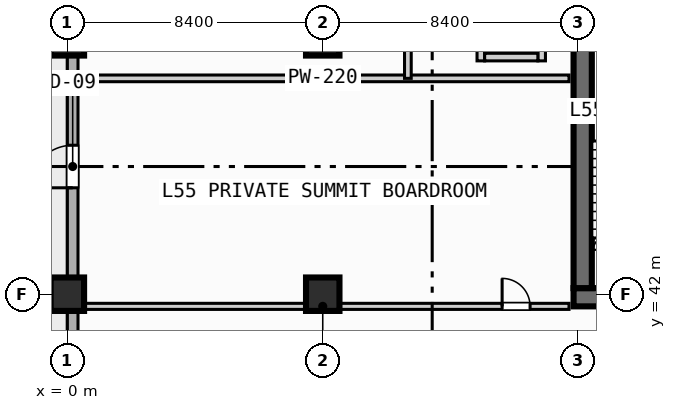
"""IFC4 building model, lengths in metres.
Left out: names, types, materials, properties, quantities, classifications, styles, units other than length and angle.
Written with IfcOpenShell. Run it as: python <this file> out.ifc"""

import sys

from ifc_helpers import new_model, si_unit, direction, frame, frame_2d, origin, origin_2d, place, context, subcontext, project, spatial, rectangle, extrude, element, fill, save


model = new_model("IFC4")
c1 = context("Model", 3, precision=1e-05, world=origin(), true_north=direction((0.0, 1.0)))
c2 = subcontext(c1, "Body", "Model", "MODEL_VIEW")
j1 = project(units=[si_unit("LENGTHUNIT", "METRE"), si_unit("PLANEANGLEUNIT", "RADIAN")], contexts=[c1])
p1 = place(None, origin())
s1 = spatial("IfcSite", under=j1, at=p1, CompositionType="ELEMENT")
p2 = place(p1, origin())
s2 = spatial("IfcBuilding", under=s1, at=p2, CompositionType="ELEMENT")
p3 = place(p2, frame((0.0, 0.0, 224.0)))
s3 = spatial("IfcBuildingStorey", under=s2, at=p3, CompositionType="ELEMENT", Elevation=224.0)
p4 = place(p3, frame((16.65, 41.9, 0.0), z_axis=(0.0, 0.0, 1.0), x_axis=(1.0, 0.0, 0.0)))
e1 = element("IfcWall", 1, at=p4, inside=s3, PredefinedType="SHEAR", context=c2, shape_type="SweptSolid", body=[
    extrude(rectangle(XDim=1.35, YDim=0.6, at=frame_2d((0.675, 0.0))), origin(), (0.0, 0.0, 1.0), 3.75),
])
p5 = place(p3, frame((16.95, 42.2, 0.0), z_axis=(0.0, 0.0, 1.0), x_axis=(0.0, 1.0, 0.0)))
e2 = element("IfcWall", 2, at=p5, inside=s3, PredefinedType="SHEAR", context=c2, shape_type="SweptSolid", body=[
    extrude(rectangle(XDim=16.35, YDim=0.6, at=frame_2d((8.175, 0.0))), origin(), (0.0, 0.0, 1.0), 3.75),
])
for number, where, z_axis, x_axis in (
    (3, (0.0, 42.0, 0.0), (0.0, 0.0, 1.0), (1.0, 0.0, 0.0)),
    (4, (0.0, 50.4, 0.0), (0.0, 0.0, 1.0), (1.0, 0.0, 0.0)),
    (5, (8.4, 42.0, 0.0), (0.0, 0.0, 1.0), (1.0, 0.0, 0.0)),
    (6, (8.4, 50.4, 0.0), (0.0, 0.0, 1.0), (1.0, 0.0, 0.0)),
):
    element("IfcColumn", number, at=place(p3, frame(where, z_axis=z_axis, x_axis=x_axis)), inside=s3, PredefinedType="COLUMN", context=c2, shape_type="SweptSolid", body=[
        extrude(rectangle(XDim=1.1, YDim=1.1, at=origin_2d()), origin(), (0.0, 0.0, 1.0), 4.2),
    ])
p6 = place(p3, frame((0.175, 3.175, 0.0), z_axis=(0.0, 0.0, 1.0), x_axis=(0.0, 1.0, 0.0)))
e7 = element("IfcWall", 7, at=p6, inside=s3, PredefinedType="STANDARD", context=c2, shape_type="SweptSolid", body=[
    extrude(rectangle(XDim=69.25, YDim=0.35, at=frame_2d((34.625, 0.0))), origin(), (0.0, 0.0, 1.0), 3.75),
])
p7 = place(p6, frame((42.325, 0.0, 0.0)))
e8 = element("IfcOpeningElement", 8, at=p7, cuts=e7, PredefinedType="OPENING", context=c2, shape_type="SweptSolid", body=[
    extrude(rectangle(XDim=1.4, YDim=2.2, at=frame_2d((0.7, 1.1))), frame((0.0, 0.185, 0.0), z_axis=(0.0, -1.0, 0.0), x_axis=(1.0, 0.0, 0.0)), (0.0, 0.0, 1.0), 0.37),
])
p8 = place(p6, frame((8.175, 0.0, 0.85)))
e9 = element("IfcOpeningElement", 9, at=p8, cuts=e7, PredefinedType="OPENING", context=c2, shape_type="SweptSolid", body=[
    extrude(rectangle(XDim=2.5, YDim=2.2, at=frame_2d((1.25, 1.1))), frame((0.0, 0.185, 0.0), z_axis=(0.0, -1.0, 0.0), x_axis=(1.0, 0.0, 0.0)), (0.0, 0.0, 1.0), 0.37),
])
p9 = place(p6, frame((24.975, 0.0, 0.85)))
e10 = element("IfcOpeningElement", 10, at=p9, cuts=e7, PredefinedType="OPENING", context=c2, shape_type="SweptSolid", body=[
    extrude(rectangle(XDim=2.5, YDim=2.2, at=frame_2d((1.25, 1.1))), frame((0.0, 0.185, 0.0), z_axis=(0.0, -1.0, 0.0), x_axis=(1.0, 0.0, 0.0)), (0.0, 0.0, 1.0), 0.37),
])
p10 = place(p6, frame((33.375, 0.0, 0.85)))
e11 = element("IfcOpeningElement", 11, at=p10, cuts=e7, PredefinedType="OPENING", context=c2, shape_type="SweptSolid", body=[
    extrude(rectangle(XDim=2.5, YDim=2.2, at=frame_2d((1.25, 1.1))), frame((0.0, 0.185, 0.0), z_axis=(0.0, -1.0, 0.0), x_axis=(1.0, 0.0, 0.0)), (0.0, 0.0, 1.0), 0.37),
])
p11 = place(p3, frame((13.6, 49.675, 0.0), z_axis=(0.0, 0.0, 1.0), x_axis=(0.0, 1.0, 0.0)))
e12 = element("IfcWall", 12, at=p11, inside=s3, PredefinedType="SOLIDWALL", context=c2, shape_type="SweptSolid", body=[
    extrude(rectangle(XDim=2.75, YDim=0.25, at=frame_2d((1.375, 0.0))), origin(), (0.0, 0.0, 1.0), 3.75),
])
p12 = place(p11, frame((0.4, 0.0, 0.0)))
e13 = element("IfcOpeningElement", 13, at=p12, cuts=e12, PredefinedType="OPENING", context=c2, shape_type="SweptSolid", body=[
    extrude(rectangle(XDim=1.1, YDim=2.15, at=frame_2d((0.55, 1.075))), frame((0.0, 0.135, 0.0), z_axis=(0.0, -1.0, 0.0), x_axis=(1.0, 0.0, 0.0)), (0.0, 0.0, 1.0), 0.27),
])
p13 = place(p3, frame((15.6, 49.675, 0.0), z_axis=(0.0, 0.0, 1.0), x_axis=(0.0, 1.0, 0.0)))
e14 = element("IfcWall", 14, at=p13, inside=s3, PredefinedType="SOLIDWALL", context=c2, shape_type="SweptSolid", body=[
    extrude(rectangle(XDim=2.75, YDim=0.25, at=frame_2d((1.375, 0.0))), origin(), (0.0, 0.0, 1.0), 3.75),
])
p14 = place(p3, frame((13.725, 49.8, 0.0), z_axis=(0.0, 0.0, 1.0), x_axis=(1.0, 0.0, 0.0)))
e15 = element("IfcWall", 15, at=p14, inside=s3, PredefinedType="SOLIDWALL", context=c2, shape_type="SweptSolid", body=[
    extrude(rectangle(XDim=1.75, YDim=0.25, at=frame_2d((0.875, 0.0))), origin(), (0.0, 0.0, 1.0), 3.75),
])
p15 = place(p3, frame((0.3, 41.6, 0.0), z_axis=(0.0, 0.0, 1.0), x_axis=(1.0, 0.0, 0.0)))
e16 = element("IfcWall", 16, at=p15, inside=s3, PredefinedType="PARTITIONING", context=c2, shape_type="SweptSolid", body=[
    extrude(rectangle(XDim=16.2, YDim=0.2, at=frame_2d((8.1, 0.0))), origin(), (0.0, 0.0, 1.0), 3.75),
])
p16 = place(p15, frame((14.0, 0.0, 0.0)))
e17 = element("IfcOpeningElement", 17, at=p16, cuts=e16, PredefinedType="OPENING", context=c2, shape_type="SweptSolid", body=[
    extrude(rectangle(XDim=0.92, YDim=2.1, at=frame_2d((0.46, 1.05))), frame((0.0, 0.11, 0.0), z_axis=(0.0, -1.0, 0.0), x_axis=(1.0, 0.0, 0.0)), (0.0, 0.0, 1.0), 0.22),
])
p17 = place(p3, frame((0.3, 49.1, 0.0), z_axis=(0.0, 0.0, 1.0), x_axis=(1.0, 0.0, 0.0)))
e18 = element("IfcWall", 18, at=p17, inside=s3, PredefinedType="PARTITIONING", context=c2, shape_type="SweptSolid", body=[
    extrude(rectangle(XDim=16.2, YDim=0.22, at=frame_2d((8.1, 0.0))), origin(), (0.0, 0.0, 1.0), 3.75),
])
p18 = place(p3, frame((11.2, 49.1, 0.0), z_axis=(0.0, 0.0, 1.0), x_axis=(0.0, 1.0, 0.0)))
e19 = element("IfcWall", 19, at=p18, inside=s3, PredefinedType="PARTITIONING", context=c2, shape_type="SweptSolid", body=[
    extrude(rectangle(XDim=9.3, YDim=0.22, at=frame_2d((4.65, 0.0))), origin(), (0.0, 0.0, 1.0), 3.75),
])
p19 = place(p7, origin())
e20 = element("IfcDoor", 20, at=p19, inside=s3, OperationType="SINGLE_SWING_LEFT", PredefinedType="DOOR", context=c2, shape_type="SweptSolid", body=[
    extrude(rectangle(XDim=1.4, YDim=2.2, at=frame_2d((0.7, 1.1))), frame((0.0, 0.025, 0.0), z_axis=(0.0, -1.0, 0.0), x_axis=(1.0, 0.0, 0.0)), (0.0, 0.0, 1.0), 0.05),
])
fill(e8, e20)
p20 = place(p16, origin())
e21 = element("IfcDoor", 21, at=p20, inside=s3, OperationType="SINGLE_SWING_LEFT", PredefinedType="DOOR", context=c2, shape_type="SweptSolid", body=[
    extrude(rectangle(XDim=0.92, YDim=2.1, at=frame_2d((0.46, 1.05))), frame((0.0, 0.025, 0.0), z_axis=(0.0, -1.0, 0.0), x_axis=(1.0, 0.0, 0.0)), (0.0, 0.0, 1.0), 0.05),
])
fill(e17, e21)
save(model, sys.argv[1])
